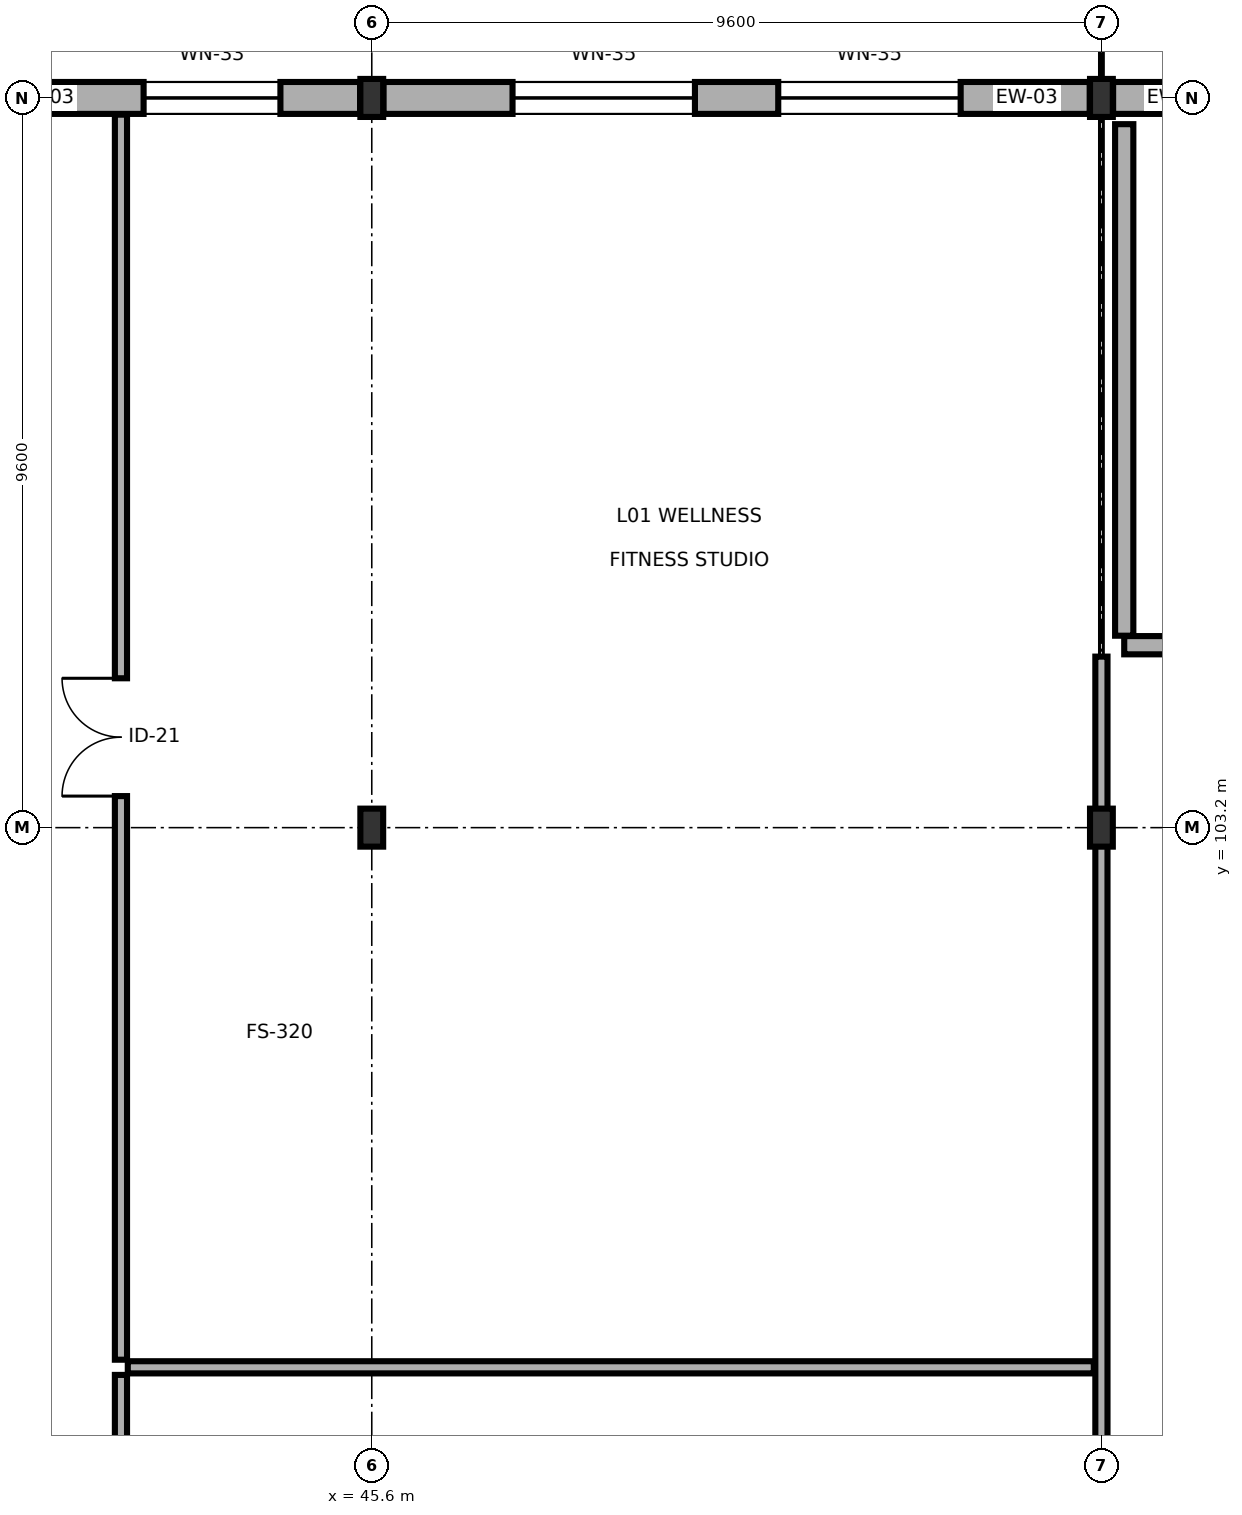
"""IFC4 building model, lengths in metres.
Left out: names, types, materials, properties, quantities, classifications, styles, units other than length and angle.
Written with IfcOpenShell. Run it as: python <this file> out.ifc"""

import sys

from ifc_helpers import new_model, si_unit, direction, frame, frame_2d, origin, origin_2d, place, context, subcontext, project, spatial, rectangle, i_section, extrude, element, fill, save


model = new_model("IFC4")
c1 = context("Model", 3, precision=1e-05, world=origin(), true_north=direction((0.0, 1.0)))
c2 = subcontext(c1, "Body", "Model", "MODEL_VIEW")
j1 = project(units=[si_unit("LENGTHUNIT", "METRE"), si_unit("PLANEANGLEUNIT", "RADIAN")], contexts=[c1])
p1 = place(None, origin())
s1 = spatial("IfcSite", under=j1, at=p1, CompositionType="ELEMENT")
p2 = place(p1, origin())
s2 = spatial("IfcBuilding", under=s1, at=p2, CompositionType="ELEMENT")
p3 = place(p2, origin())
s3 = spatial("IfcBuildingStorey", under=s2, at=p3, CompositionType="ELEMENT", Elevation=0.0)
for number, where, z_axis, x_axis in (
    (1, (45.6, 103.2, 0.0), (0.0, 0.0, 1.0), (1.0, 0.0, 0.0)),
    (2, (45.6, 112.8, 0.0), (0.0, 0.0, 1.0), (1.0, 0.0, 0.0)),
    (3, (55.2, 103.2, 0.0), (0.0, 0.0, 1.0), (1.0, 0.0, 0.0)),
    (4, (55.2, 112.8, 0.0), (0.0, 0.0, 1.0), (1.0, 0.0, 0.0)),
):
    element("IfcColumn", number, at=place(p3, frame(where, z_axis=z_axis, x_axis=x_axis)), inside=s3, PredefinedType="COLUMN", context=c2, shape_type="SweptSolid", body=[
        extrude(i_section(OverallWidth=0.3, OverallDepth=0.5, WebThickness=0.014, FlangeThickness=0.028, FilletRadius=0.027, at=origin_2d()), origin(), (0.0, 0.0, 1.0), 5.4),
    ])
p4 = place(p3, frame((36.154, 112.8, 0.0), z_axis=(0.0, 0.0, 1.0), x_axis=(1.0, 0.0, 0.0)))
e5 = element("IfcWall", 5, at=p4, inside=s3, PredefinedType="SOLIDWALL", context=c2, shape_type="SweptSolid", body=[
    extrude(rectangle(XDim=9.292, YDim=0.42, at=frame_2d((4.646, 0.0))), origin(), (0.0, 0.0, 1.0), 4.625),
])
p5 = place(p4, frame((1.998, 0.0, 0.75)))
e6 = element("IfcOpeningElement", 6, at=p5, cuts=e5, PredefinedType="OPENING", context=c2, shape_type="SweptSolid", body=[
    extrude(rectangle(XDim=1.8, YDim=2.1, at=frame_2d((0.9, 1.05))), frame((0.0, 0.22, 0.0), z_axis=(0.0, -1.0, 0.0), x_axis=(1.0, 0.0, 0.0)), (0.0, 0.0, 1.0), 0.44),
])
p6 = place(p4, frame((6.444, 0.0, 0.75)))
e7 = element("IfcOpeningElement", 7, at=p6, cuts=e5, PredefinedType="OPENING", context=c2, shape_type="SweptSolid", body=[
    extrude(rectangle(XDim=1.8, YDim=2.1, at=frame_2d((0.9, 1.05))), frame((0.0, 0.22, 0.0), z_axis=(0.0, -1.0, 0.0), x_axis=(1.0, 0.0, 0.0)), (0.0, 0.0, 1.0), 0.44),
])
p7 = place(p3, frame((45.754, 112.8, 0.0), z_axis=(0.0, 0.0, 1.0), x_axis=(1.0, 0.0, 0.0)))
e8 = element("IfcWall", 8, at=p7, inside=s3, PredefinedType="SOLIDWALL", context=c2, shape_type="SweptSolid", body=[
    extrude(rectangle(XDim=9.292, YDim=0.42, at=frame_2d((4.646, 0.0))), origin(), (0.0, 0.0, 1.0), 4.625),
])
p8 = place(p7, frame((1.698, 0.0, 0.75)))
e9 = element("IfcOpeningElement", 9, at=p8, cuts=e8, PredefinedType="OPENING", context=c2, shape_type="SweptSolid", body=[
    extrude(rectangle(XDim=2.4, YDim=2.1, at=frame_2d((1.2, 1.05))), frame((0.0, 0.22, 0.0), z_axis=(0.0, -1.0, 0.0), x_axis=(1.0, 0.0, 0.0)), (0.0, 0.0, 1.0), 0.44),
])
p9 = place(p7, frame((5.194, 0.0, 0.75)))
e10 = element("IfcOpeningElement", 10, at=p9, cuts=e8, PredefinedType="OPENING", context=c2, shape_type="SweptSolid", body=[
    extrude(rectangle(XDim=2.4, YDim=2.1, at=frame_2d((1.2, 1.05))), frame((0.0, 0.22, 0.0), z_axis=(0.0, -1.0, 0.0), x_axis=(1.0, 0.0, 0.0)), (0.0, 0.0, 1.0), 0.44),
])
p10 = place(p3, frame((55.354, 112.8, 0.0), z_axis=(0.0, 0.0, 1.0), x_axis=(1.0, 0.0, 0.0)))
e11 = element("IfcWall", 11, at=p10, inside=s3, PredefinedType="SOLIDWALL", context=c2, shape_type="SweptSolid", body=[
    extrude(rectangle(XDim=9.292, YDim=0.42, at=frame_2d((4.646, 0.0))), origin(), (0.0, 0.0, 1.0), 4.625),
])
p11 = place(p10, frame((1.45, 0.0, 0.0)))
e12 = element("IfcOpeningElement", 12, at=p11, cuts=e11, PredefinedType="OPENING", context=c2, shape_type="SweptSolid", body=[
    extrude(rectangle(XDim=2.2, YDim=2.4, at=frame_2d((1.1, 1.2))), frame((0.0, 0.22, 0.0), z_axis=(0.0, -1.0, 0.0), x_axis=(1.0, 0.0, 0.0)), (0.0, 0.0, 1.0), 0.44),
])
p12 = place(p10, frame((5.442, 0.0, 0.0)))
e13 = element("IfcOpeningElement", 13, at=p12, cuts=e11, PredefinedType="OPENING", context=c2, shape_type="SweptSolid", body=[
    extrude(rectangle(XDim=2.2, YDim=2.4, at=frame_2d((1.1, 1.2))), frame((0.0, 0.22, 0.0), z_axis=(0.0, -1.0, 0.0), x_axis=(1.0, 0.0, 0.0)), (0.0, 0.0, 1.0), 0.44),
])
p13 = place(p3, frame((55.5, 105.6, 0.0), z_axis=(0.0, 0.0, 1.0), x_axis=(1.0, 0.0, 0.0)))
e14 = element("IfcWall", 14, at=p13, inside=s3, PredefinedType="SOLIDWALL", context=c2, shape_type="SweptSolid", body=[
    extrude(rectangle(XDim=7.1, YDim=0.24, at=frame_2d((3.55, 0.0))), origin(), (0.0, 0.0, 1.0), 5.14),
])
p14 = place(p13, frame((2.95, 0.0, 0.0)))
e15 = element("IfcOpeningElement", 15, at=p14, cuts=e14, PredefinedType="OPENING", context=c2, shape_type="SweptSolid", body=[
    extrude(rectangle(XDim=1.2, YDim=2.2, at=frame_2d((0.6, 1.1))), frame((0.0, 0.13, 0.0), z_axis=(0.0, -1.0, 0.0), x_axis=(1.0, 0.0, 0.0)), (0.0, 0.0, 1.0), 0.26),
])
p15 = place(p3, frame((55.5, 105.725, 0.0), z_axis=(0.0, 0.0, 1.0), x_axis=(0.0, 1.0, 0.0)))
e16 = element("IfcWall", 16, at=p15, inside=s3, PredefinedType="SOLIDWALL", context=c2, shape_type="SweptSolid", body=[
    extrude(rectangle(XDim=6.73, YDim=0.24, at=frame_2d((3.365, 0.0))), origin(), (0.0, 0.0, 1.0), 4.625),
])
p16 = place(p3, frame((42.3, 74.62, 0.0), z_axis=(0.0, 0.0, 1.0), x_axis=(0.0, 1.0, 0.0)))
e17 = element("IfcWall", 17, at=p16, inside=s3, PredefinedType="PARTITIONING", context=c2, shape_type="SweptSolid", body=[
    extrude(rectangle(XDim=21.38, YDim=0.16, at=frame_2d((10.69, 0.0))), origin(), (0.0, 0.0, 1.0), 4.585),
])
p17 = place(p16, frame((9.965, 0.0, 0.0)))
e18 = element("IfcOpeningElement", 18, at=p17, cuts=e17, PredefinedType="OPENING", context=c2, shape_type="SweptSolid", body=[
    extrude(rectangle(XDim=1.45, YDim=2.24, at=frame_2d((0.725, 1.12))), frame((0.0, 0.09, 0.0), z_axis=(0.0, -1.0, 0.0), x_axis=(1.0, 0.0, 0.0)), (0.0, 0.0, 1.0), 0.18),
])
p18 = place(p3, frame((42.3, 96.2, 0.0), z_axis=(0.0, 0.0, 1.0), x_axis=(0.0, 1.0, 0.0)))
e19 = element("IfcWall", 19, at=p18, inside=s3, PredefinedType="PARTITIONING", context=c2, shape_type="SweptSolid", body=[
    extrude(rectangle(XDim=16.38, YDim=0.16, at=frame_2d((8.19, 0.0))), origin(), (0.0, 0.0, 1.0), 4.585),
])
p19 = place(p18, frame((7.415, 0.0, 0.0)))
e20 = element("IfcOpeningElement", 20, at=p19, cuts=e19, PredefinedType="OPENING", context=c2, shape_type="SweptSolid", body=[
    extrude(rectangle(XDim=1.55, YDim=2.26, at=frame_2d((0.775, 1.13))), frame((0.0, 0.09, 0.0), z_axis=(0.0, -1.0, 0.0), x_axis=(1.0, 0.0, 0.0)), (0.0, 0.0, 1.0), 0.18),
])
p20 = place(p3, frame((42.39, 96.1, 0.0), z_axis=(0.0, 0.0, 1.0), x_axis=(1.0, 0.0, 0.0)))
e21 = element("IfcWall", 21, at=p20, inside=s3, PredefinedType="PARTITIONING", context=c2, shape_type="SweptSolid", body=[
    extrude(rectangle(XDim=12.71, YDim=0.16, at=frame_2d((6.355, 0.0))), origin(), (0.0, 0.0, 1.0), 4.625),
])
p21 = place(p3, frame((55.2, 80.55, 0.0), z_axis=(0.0, 0.0, 1.0), x_axis=(0.0, 1.0, 0.0)))
e22 = element("IfcWall", 22, at=p21, inside=s3, PredefinedType="PARTITIONING", context=c2, shape_type="SweptSolid", body=[
    extrude(rectangle(XDim=24.9, YDim=0.16, at=frame_2d((12.45, 0.0))), origin(), (0.0, 0.0, 1.0), 4.625),
])
p22 = place(p21, frame((0.16, 0.0, 0.0)))
e23 = element("IfcOpeningElement", 23, at=p22, cuts=e22, PredefinedType="OPENING", context=c2, shape_type="SweptSolid", body=[
    extrude(rectangle(XDim=1.5, YDim=2.25, at=frame_2d((0.75, 1.125))), frame((0.0, 0.09, 0.0), z_axis=(0.0, -1.0, 0.0), x_axis=(1.0, 0.0, 0.0)), (0.0, 0.0, 1.0), 0.18),
])
p23 = place(p6, origin())
e24 = element("IfcWindow", 24, at=p23, inside=s3, PartitioningType="SINGLE_PANEL", PredefinedType="WINDOW", context=c2, shape_type="SweptSolid", body=[
    extrude(rectangle(XDim=1.8, YDim=2.1, at=frame_2d((0.9, 1.05))), frame((0.0, 0.03, 0.0), z_axis=(0.0, -1.0, 0.0), x_axis=(1.0, 0.0, 0.0)), (0.0, 0.0, 1.0), 0.06),
])
fill(e7, e24)
p24 = place(p8, origin())
e25 = element("IfcWindow", 25, at=p24, inside=s3, PartitioningType="SINGLE_PANEL", PredefinedType="WINDOW", context=c2, shape_type="SweptSolid", body=[
    extrude(rectangle(XDim=2.4, YDim=2.1, at=frame_2d((1.2, 1.05))), frame((0.0, 0.03, 0.0), z_axis=(0.0, -1.0, 0.0), x_axis=(1.0, 0.0, 0.0)), (0.0, 0.0, 1.0), 0.06),
])
fill(e9, e25)
p25 = place(p9, origin())
e26 = element("IfcWindow", 26, at=p25, inside=s3, PartitioningType="SINGLE_PANEL", PredefinedType="WINDOW", context=c2, shape_type="SweptSolid", body=[
    extrude(rectangle(XDim=2.4, YDim=2.1, at=frame_2d((1.2, 1.05))), frame((0.0, 0.03, 0.0), z_axis=(0.0, -1.0, 0.0), x_axis=(1.0, 0.0, 0.0)), (0.0, 0.0, 1.0), 0.06),
])
fill(e10, e26)
p26 = place(p19, origin())
e27 = element("IfcDoor", 27, at=p26, inside=s3, OperationType="DOUBLE_DOOR_SINGLE_SWING", PredefinedType="DOOR", context=c2, shape_type="SweptSolid", body=[
    extrude(rectangle(XDim=1.55, YDim=2.26, at=frame_2d((0.775, 1.13))), frame((0.0, 0.025, 0.0), z_axis=(0.0, -1.0, 0.0), x_axis=(1.0, 0.0, 0.0)), (0.0, 0.0, 1.0), 0.05),
])
fill(e20, e27)
save(model, sys.argv[1])
